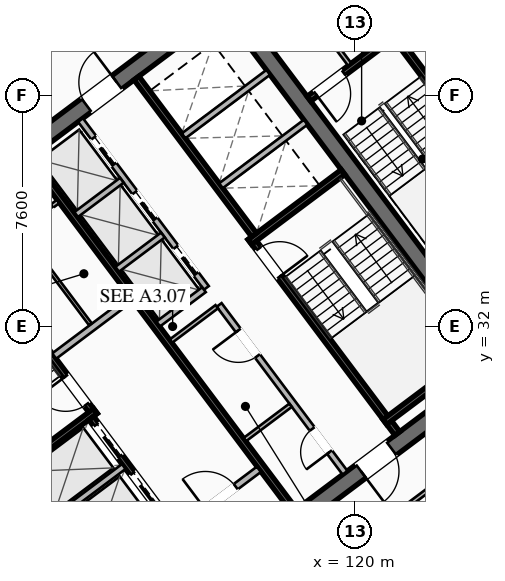
"""IFC4 building model, lengths in metres.
Left out: names, types, materials, properties, quantities, classifications, styles, units other than length and angle.
Written with IfcOpenShell. Run it as: python <this file> out.ifc"""

import sys

from ifc_helpers import new_model, si_unit, direction, frame, frame_2d, origin, place, context, subcontext, project, spatial, rectangle, extrude, element, fill, save


model = new_model("IFC4")
c1 = context("Model", 3, precision=1e-05, world=origin(), true_north=direction((0.0, 1.0)))
c2 = subcontext(c1, "Body", "Model", "MODEL_VIEW")
j1 = project(units=[si_unit("LENGTHUNIT", "METRE"), si_unit("PLANEANGLEUNIT", "RADIAN")], contexts=[c1])
p1 = place(None, origin())
s1 = spatial("IfcSite", under=j1, at=p1, CompositionType="ELEMENT")
p2 = place(p1, origin())
s2 = spatial("IfcBuilding", under=s1, at=p2, CompositionType="ELEMENT")
p3 = place(p2, frame((0.0, 0.0, 181.85)))
s3 = spatial("IfcBuildingStorey", under=s2, at=p3, CompositionType="ELEMENT", Elevation=181.85)
for number, where, z_axis, x_axis in (
    (1, (112.436, 21.077, 0.0), (0.0, 0.0, 1.0), (-0.6, 0.8, 0.0)),
    (2, (115.564, 42.923, 0.0), (0.0, 0.0, 1.0), (0.6, -0.8, 0.0)),
):
    element("IfcWall", number, at=place(p3, frame(where, z_axis=z_axis, x_axis=x_axis)), inside=s3, PredefinedType="SHEAR", context=c2, shape_type="SweptSolid", body=[
        extrude(rectangle(XDim=15.6, YDim=0.55, at=frame_2d((7.8, 0.0))), origin(), (0.0, 0.0, 1.0), 3.55),
    ])
p4 = place(p3, frame((124.539, 30.498, 0.0), z_axis=(0.0, 0.0, 1.0), x_axis=(-0.799998054672, -0.600002593761, 0.0)))
e3 = element("IfcWall", 3, at=p4, inside=s3, PredefinedType="SHEAR", context=c2, shape_type="SweptSolid", body=[
    extrude(rectangle(XDim=15.06, YDim=0.55, at=frame_2d((7.53, 0.0))), origin(), (0.0, 0.0, 1.0), 3.55),
])
p5 = place(p4, frame((9.23, 0.0, 0.0)))
e4 = element("IfcOpeningElement", 4, at=p5, cuts=e3, PredefinedType="OPENING", context=c2, shape_type="SweptSolid", body=[
    extrude(rectangle(XDim=1.25, YDim=2.25, at=frame_2d((0.625, 1.125))), frame((0.0, 0.285, 0.0), z_axis=(0.0, -1.0, 0.0), x_axis=(1.0, 0.0, 0.0)), (0.0, 0.0, 1.0), 0.57),
])
p6 = place(p4, frame((4.18, 0.0, 0.0)))
e5 = element("IfcOpeningElement", 5, at=p6, cuts=e3, PredefinedType="OPENING", context=c2, shape_type="SweptSolid", body=[
    extrude(rectangle(XDim=1.25, YDim=2.25, at=frame_2d((0.625, 1.125))), frame((0.0, 0.285, 0.0), z_axis=(0.0, -1.0, 0.0), x_axis=(1.0, 0.0, 0.0)), (0.0, 0.0, 1.0), 0.57),
])
p7 = place(p3, frame((103.461, 33.502, 0.0), z_axis=(0.0, 0.0, 1.0), x_axis=(0.799998054672, 0.600002593761, 0.0)))
e6 = element("IfcWall", 6, at=p7, inside=s3, PredefinedType="SHEAR", context=c2, shape_type="SweptSolid", body=[
    extrude(rectangle(XDim=15.06, YDim=0.55, at=frame_2d((7.53, 0.0))), origin(), (0.0, 0.0, 1.0), 3.55),
])
p8 = place(p7, frame((4.58, 0.0, 0.0)))
e7 = element("IfcOpeningElement", 7, at=p8, cuts=e6, PredefinedType="OPENING", context=c2, shape_type="SweptSolid", body=[
    extrude(rectangle(XDim=1.25, YDim=2.25, at=frame_2d((0.625, 1.125))), frame((0.0, 0.285, 0.0), z_axis=(0.0, -1.0, 0.0), x_axis=(1.0, 0.0, 0.0)), (0.0, 0.0, 1.0), 0.57),
])
p9 = place(p7, frame((9.63, 0.0, 0.0)))
e8 = element("IfcOpeningElement", 8, at=p9, cuts=e6, PredefinedType="OPENING", context=c2, shape_type="SweptSolid", body=[
    extrude(rectangle(XDim=1.25, YDim=2.25, at=frame_2d((0.625, 1.125))), frame((0.0, 0.285, 0.0), z_axis=(0.0, -1.0, 0.0), x_axis=(1.0, 0.0, 0.0)), (0.0, 0.0, 1.0), 0.57),
])
p10 = place(p3, frame((111.44, 29.08, 0.0), z_axis=(0.0, 0.0, 1.0), x_axis=(-0.59999029481, 0.8000072788, 0.0)))
e9 = element("IfcWall", 9, at=p10, inside=s3, PredefinedType="SHEAR", context=c2, shape_type="SweptSolid", body=[
    extrude(rectangle(XDim=8.05, YDim=0.2, at=frame_2d((4.025, 0.0))), origin(), (0.0, 0.0, 1.0), 3.37),
])
p11 = place(p10, frame((0.45, 0.0, 0.0)))
e10 = element("IfcOpeningElement", 10, at=p11, cuts=e9, PredefinedType="OPENING", context=c2, shape_type="SweptSolid", body=[
    extrude(rectangle(XDim=1.15, YDim=2.2, at=frame_2d((0.575, 1.1))), frame((0.0, 0.11, 0.0), z_axis=(0.0, -1.0, 0.0), x_axis=(1.0, 0.0, 0.0)), (0.0, 0.0, 1.0), 0.22),
])
p12 = place(p3, frame((108.396, 26.922, 0.0), z_axis=(0.0, 0.0, 1.0), x_axis=(0.800015298837, 0.599979601008, 0.0)))
e11 = element("IfcWall", 11, at=p12, inside=s3, PredefinedType="SHEAR", context=c2, shape_type="SweptSolid", body=[
    extrude(rectangle(XDim=3.83, YDim=0.2, at=frame_2d((1.915, 0.0))), origin(), (0.0, 0.0, 1.0), 3.37),
])
p13 = place(p3, frame((116.56, 34.92, 0.0), z_axis=(0.0, 0.0, 1.0), x_axis=(0.59999029481, -0.8000072788, 0.0)))
e12 = element("IfcWall", 12, at=p13, inside=s3, PredefinedType="SHEAR", context=c2, shape_type="SweptSolid", body=[
    extrude(rectangle(XDim=8.05, YDim=0.2, at=frame_2d((4.025, 0.0))), origin(), (0.0, 0.0, 1.0), 3.37),
])
p14 = place(p13, frame((0.45, 0.0, 0.0)))
e13 = element("IfcOpeningElement", 13, at=p14, cuts=e12, PredefinedType="OPENING", context=c2, shape_type="SweptSolid", body=[
    extrude(rectangle(XDim=1.15, YDim=2.2, at=frame_2d((0.575, 1.1))), frame((0.0, 0.11, 0.0), z_axis=(0.0, -1.0, 0.0), x_axis=(1.0, 0.0, 0.0)), (0.0, 0.0, 1.0), 0.22),
])
for number, where, z_axis, x_axis in (
    (14, (116.54, 34.78, 0.0), (0.0, 0.0, 1.0), (0.8, 0.6, 0.0)),
    (15, (120.98, 28.86, 0.0), (0.0, 0.0, 1.0), (0.8, 0.6, 0.0)),
):
    element("IfcWall", number, at=place(p3, frame(where, z_axis=z_axis, x_axis=x_axis)), inside=s3, PredefinedType="SHEAR", context=c2, shape_type="SweptSolid", body=[
        extrude(rectangle(XDim=3.83, YDim=0.2, at=frame_2d((1.915, 0.0))), origin(), (0.0, 0.0, 1.0), 3.37),
    ])
p15 = place(p3, frame((117.998, 25.936, 0.0), z_axis=(0.0, 0.0, 1.0), x_axis=(-0.600002693989, 0.799997979501, 0.0)))
e16 = element("IfcWall", 16, at=p15, inside=s3, PredefinedType="SHEAR", context=c2, shape_type="SweptSolid", body=[
    extrude(rectangle(XDim=14.5, YDim=0.2, at=frame_2d((7.25, 0.0))), origin(), (0.0, 0.0, 1.0), 3.37),
])
p16 = place(p3, frame((110.104, 31.028, 0.0), z_axis=(0.0, 0.0, 1.0), x_axis=(0.800018601094, 0.59997519774, 0.0)))
e17 = element("IfcWall", 17, at=p16, inside=s3, PredefinedType="SOLIDWALL", context=c2, shape_type="SweptSolid", body=[
    extrude(rectangle(XDim=3.15, YDim=0.22, at=frame_2d((1.575, 0.0))), origin(), (0.0, 0.0, 1.0), 2.723),
])
p17 = place(p3, frame((114.316, 25.412, 0.0), z_axis=(0.0, 0.0, 1.0), x_axis=(0.800018601094, 0.59997519774, 0.0)))
e18 = element("IfcWall", 18, at=p17, inside=s3, PredefinedType="SOLIDWALL", context=c2, shape_type="SweptSolid", body=[
    extrude(rectangle(XDim=3.15, YDim=0.22, at=frame_2d((1.575, 0.0))), origin(), (0.0, 0.0, 1.0), 2.723),
])
p18 = place(p17, frame((0.95, 0.0, 0.0)))
e19 = element("IfcOpeningElement", 19, at=p18, cuts=e18, PredefinedType="OPENING", context=c2, shape_type="SweptSolid", body=[
    extrude(rectangle(XDim=1.25, YDim=2.25, at=frame_2d((0.625, 1.125))), frame((0.0, 0.12, 0.0), z_axis=(0.0, -1.0, 0.0), x_axis=(1.0, 0.0, 0.0)), (0.0, 0.0, 1.0), 0.24),
])
p19 = place(p3, frame((115.19, 23.83, 0.0), z_axis=(0.0, 0.0, 1.0), x_axis=(-0.599993943644, 0.800004542231, 0.0)))
e20 = element("IfcWall", 20, at=p19, inside=s3, PredefinedType="SHEAR", context=c2, shape_type="SweptSolid", body=[
    extrude(rectangle(XDim=6.45, YDim=0.2, at=frame_2d((3.225, 0.0))), origin(), (0.0, 0.0, 1.0), 3.37),
])
p20 = place(p19, frame((4.875, 0.0, 0.0)))
e21 = element("IfcOpeningElement", 21, at=p20, cuts=e20, PredefinedType="OPENING", context=c2, shape_type="SweptSolid", body=[
    extrude(rectangle(XDim=1.3, YDim=2.25, at=frame_2d((0.65, 1.125))), frame((0.0, 0.11, 0.0), z_axis=(0.0, -1.0, 0.0), x_axis=(1.0, 0.0, 0.0)), (0.0, 0.0, 1.0), 0.22),
])
p21 = place(p19, frame((2.875, 0.0, 0.0)))
e22 = element("IfcOpeningElement", 22, at=p21, cuts=e20, PredefinedType="OPENING", context=c2, shape_type="SweptSolid", body=[
    extrude(rectangle(XDim=1.3, YDim=2.25, at=frame_2d((0.65, 1.125))), frame((0.0, 0.11, 0.0), z_axis=(0.0, -1.0, 0.0), x_axis=(1.0, 0.0, 0.0)), (0.0, 0.0, 1.0), 0.22),
])
p22 = place(p19, frame((0.675, 0.0, 0.0)))
e23 = element("IfcOpeningElement", 23, at=p22, cuts=e20, PredefinedType="OPENING", context=c2, shape_type="SweptSolid", body=[
    extrude(rectangle(XDim=1.3, YDim=2.25, at=frame_2d((0.65, 1.125))), frame((0.0, 0.11, 0.0), z_axis=(0.0, -1.0, 0.0), x_axis=(1.0, 0.0, 0.0)), (0.0, 0.0, 1.0), 0.22),
])
p23 = place(p3, frame((109.608, 25.306, 0.0), z_axis=(0.0, 0.0, 1.0), x_axis=(0.8, 0.6, 0.0)))
e24 = element("IfcWall", 24, at=p23, inside=s3, PredefinedType="SOLIDWALL", context=c2, shape_type="SweptSolid", body=[
    extrude(rectangle(XDim=3.48, YDim=0.2, at=frame_2d((1.74, 0.0))), origin(), (0.0, 0.0, 1.0), 3.37),
])
p24 = place(p3, frame((112.81, 40.17, 0.0), z_axis=(0.0, 0.0, 1.0), x_axis=(0.599993943644, -0.800004542231, 0.0)))
e25 = element("IfcWall", 25, at=p24, inside=s3, PredefinedType="SHEAR", context=c2, shape_type="SweptSolid", body=[
    extrude(rectangle(XDim=6.45, YDim=0.2, at=frame_2d((3.225, 0.0))), origin(), (0.0, 0.0, 1.0), 3.37),
])
for number, where, z_axis, x_axis in (
    (26, (115.59, 36.63, 0.0), (0.0, 0.0, 1.0), (0.8, 0.6, 0.0)),
    (27, (114.36, 38.27, 0.0), (0.0, 0.0, 1.0), (0.8, 0.6, 0.0)),
):
    element("IfcWall", number, at=place(p3, frame(where, z_axis=z_axis, x_axis=x_axis)), inside=s3, PredefinedType="SOLIDWALL", context=c2, shape_type="SweptSolid", body=[
        extrude(rectangle(XDim=3.48, YDim=0.2, at=frame_2d((1.74, 0.0))), origin(), (0.0, 0.0, 1.0), 3.37),
    ])
p25 = place(p3, frame((107.71, 34.22, 0.0), z_axis=(0.0, 0.0, 1.0), x_axis=(0.799981399002, 0.60002480053, 0.0)))
e28 = element("IfcWall", 28, at=p25, inside=s3, PredefinedType="PARTITIONING", context=c2, shape_type="SweptSolid", body=[
    extrude(rectangle(XDim=3.15, YDim=0.135, at=frame_2d((1.575, 0.0))), origin(), (0.0, 0.0, 1.0), 2.723),
])
p26 = place(p25, frame((0.25, 0.0, 0.0)))
e29 = element("IfcOpeningElement", 29, at=p26, cuts=e28, PredefinedType="OPENING", context=c2, shape_type="SweptSolid", body=[
    extrude(rectangle(XDim=0.95, YDim=2.05, at=frame_2d((0.475, 1.025))), frame((0.0, 0.077, 0.0), z_axis=(0.0, -1.0, 0.0), x_axis=(1.0, 0.0, 0.0)), (0.0, 0.0, 1.0), 0.155),
])
p27 = place(p25, frame((1.95, 0.0, 0.0)))
e30 = element("IfcOpeningElement", 30, at=p27, cuts=e28, PredefinedType="OPENING", context=c2, shape_type="SweptSolid", body=[
    extrude(rectangle(XDim=0.95, YDim=2.05, at=frame_2d((0.475, 1.025))), frame((0.0, 0.077, 0.0), z_axis=(0.0, -1.0, 0.0), x_axis=(1.0, 0.0, 0.0)), (0.0, 0.0, 1.0), 0.155),
])
p28 = place(p3, frame((111.296, 32.072, 0.0), z_axis=(0.0, 0.0, 1.0), x_axis=(-0.59995887973, 0.800030838552, 0.0)))
e31 = element("IfcWall", 31, at=p28, inside=s3, PredefinedType="PARTITIONING", context=c2, shape_type="SweptSolid", body=[
    extrude(rectangle(XDim=3.8, YDim=0.11, at=frame_2d((1.9, 0.0))), origin(), (0.0, 0.0, 1.0), 2.723),
])
p29 = place(p3, frame((119.67, 27.19, 0.0), z_axis=(0.0, 0.0, 1.0), x_axis=(-0.599988677396, 0.800008491828, 0.0)))
e32 = element("IfcWall", 32, at=p29, inside=s3, PredefinedType="SOLIDWALL", context=c2, shape_type="SweptSolid", body=[
    extrude(rectangle(XDim=6.9, YDim=0.2, at=frame_2d((3.45, 0.0))), origin(), (0.0, 0.0, 1.0), 2.723),
])
p30 = place(p29, frame((0.85, 0.0, 0.0)))
e33 = element("IfcOpeningElement", 33, at=p30, cuts=e32, PredefinedType="OPENING", context=c2, shape_type="SweptSolid", body=[
    extrude(rectangle(XDim=0.95, YDim=2.05, at=frame_2d((0.475, 1.025))), frame((0.0, 0.11, 0.0), z_axis=(0.0, -1.0, 0.0), x_axis=(1.0, 0.0, 0.0)), (0.0, 0.0, 1.0), 0.22),
])
p31 = place(p29, frame((4.8, 0.0, 0.0)))
e34 = element("IfcOpeningElement", 34, at=p31, cuts=e32, PredefinedType="OPENING", context=c2, shape_type="SweptSolid", body=[
    extrude(rectangle(XDim=1.05, YDim=2.2, at=frame_2d((0.525, 1.1))), frame((0.0, 0.11, 0.0), z_axis=(0.0, -1.0, 0.0), x_axis=(1.0, 0.0, 0.0)), (0.0, 0.0, 1.0), 0.22),
])
for number, where, z_axis, x_axis in (
    (35, (113.946, 31.522, 0.0), (0.0, 0.0, 1.0), (0.8, 0.6, 0.0)),
    (36, (116.376, 28.282, 0.0), (0.0, 0.0, 1.0), (0.8, 0.6, 0.0)),
):
    element("IfcWall", number, at=place(p3, frame(where, z_axis=z_axis, x_axis=x_axis)), inside=s3, PredefinedType="PARTITIONING", context=c2, shape_type="SweptSolid", body=[
        extrude(rectangle(XDim=1.88, YDim=0.135, at=frame_2d((0.94, 0.0))), origin(), (0.0, 0.0, 1.0), 2.723),
    ])
p32 = place(p3, frame((115.11, 33.27, 0.0), z_axis=(0.0, 0.0, 1.0), x_axis=(-0.600011322243, 0.799991508192, 0.0)))
e37 = element("IfcWall", 37, at=p32, inside=s3, PredefinedType="SOLIDWALL", context=c2, shape_type="SweptSolid", body=[
    extrude(rectangle(XDim=6.9, YDim=0.2, at=frame_2d((3.45, 0.0))), origin(), (0.0, 0.0, 1.0), 3.37),
])
p33 = place(p32, frame((0.575, 0.0, 0.0)))
e38 = element("IfcOpeningElement", 38, at=p33, cuts=e37, PredefinedType="OPENING", context=c2, shape_type="SweptSolid", body=[
    extrude(rectangle(XDim=1.1, YDim=2.2, at=frame_2d((0.55, 1.1))), frame((0.0, 0.11, 0.0), z_axis=(0.0, -1.0, 0.0), x_axis=(1.0, 0.0, 0.0)), (0.0, 0.0, 1.0), 0.22),
])
p34 = place(p32, frame((2.825, 0.0, 0.0)))
e39 = element("IfcOpeningElement", 39, at=p34, cuts=e37, PredefinedType="OPENING", context=c2, shape_type="SweptSolid", body=[
    extrude(rectangle(XDim=1.1, YDim=2.2, at=frame_2d((0.55, 1.1))), frame((0.0, 0.11, 0.0), z_axis=(0.0, -1.0, 0.0), x_axis=(1.0, 0.0, 0.0)), (0.0, 0.0, 1.0), 0.22),
])
p35 = place(p32, frame((5.075, 0.0, 0.0)))
e40 = element("IfcOpeningElement", 40, at=p35, cuts=e37, PredefinedType="OPENING", context=c2, shape_type="SweptSolid", body=[
    extrude(rectangle(XDim=1.1, YDim=2.2, at=frame_2d((0.55, 1.1))), frame((0.0, 0.11, 0.0), z_axis=(0.0, -1.0, 0.0), x_axis=(1.0, 0.0, 0.0)), (0.0, 0.0, 1.0), 0.22),
])
p36 = place(p3, frame((113.526, 32.082, 0.0), z_axis=(0.0, 0.0, 1.0), x_axis=(0.800046745961, 0.599937666993, 0.0)))
e41 = element("IfcWall", 41, at=p36, inside=s3, PredefinedType="SOLIDWALL", context=c2, shape_type="SweptSolid", body=[
    extrude(rectangle(XDim=1.88, YDim=0.2, at=frame_2d((0.94, 0.0))), origin(), (0.0, 0.0, 1.0), 3.37),
])
p37 = place(p3, frame((112.176, 33.882, 0.0), z_axis=(0.0, 0.0, 1.0), x_axis=(0.8, 0.6, 0.0)))
e42 = element("IfcWall", 42, at=p37, inside=s3, PredefinedType="SOLIDWALL", context=c2, shape_type="SweptSolid", body=[
    extrude(rectangle(XDim=1.88, YDim=0.2, at=frame_2d((0.94, 0.0))), origin(), (0.0, 0.0, 1.0), 3.37),
])
p38 = place(p3, frame((110.826, 35.682, 0.0), z_axis=(0.0, 0.0, 1.0), x_axis=(0.799984418148, 0.600020775241, 0.0)))
e43 = element("IfcWall", 43, at=p38, inside=s3, PredefinedType="SOLIDWALL", context=c2, shape_type="SweptSolid", body=[
    extrude(rectangle(XDim=1.88, YDim=0.2, at=frame_2d((0.94, 0.0))), origin(), (0.0, 0.0, 1.0), 3.37),
])
p39 = place(p3, frame((125.304, 36.228, 0.0), z_axis=(0.0, 0.0, 1.0), x_axis=(-0.59998851072, 0.800008616831, 0.0)))
e44 = element("IfcWall", 44, at=p39, inside=s3, PredefinedType="SHEAR", context=c2, shape_type="SweptSolid", body=[
    extrude(rectangle(XDim=6.8, YDim=0.2, at=frame_2d((3.4, 0.0))), origin(), (0.0, 0.0, 1.0), 3.37),
])
p40 = place(p3, frame((121.204, 41.528, 0.0), z_axis=(0.0, 0.0, 1.0), x_axis=(-0.800017232136, -0.599977023131, 0.0)))
e45 = element("IfcWall", 45, at=p40, inside=s3, PredefinedType="SHEAR", context=c2, shape_type="SweptSolid", body=[
    extrude(rectangle(XDim=3.4, YDim=0.2, at=frame_2d((1.7, 0.0))), origin(), (0.0, 0.0, 1.0), 3.37),
])
p41 = place(p40, frame((1.975, 0.0, 0.0)))
e46 = element("IfcOpeningElement", 46, at=p41, cuts=e45, PredefinedType="OPENING", context=c2, shape_type="SweptSolid", body=[
    extrude(rectangle(XDim=1.15, YDim=2.2, at=frame_2d((0.575, 1.1))), frame((0.0, 0.11, 0.0), z_axis=(0.0, -1.0, 0.0), x_axis=(1.0, 0.0, 0.0)), (0.0, 0.0, 1.0), 0.22),
])
p42 = place(p3, frame((119.824, 40.618, 0.0), z_axis=(0.0, 0.0, 1.0), x_axis=(-0.599982243973, 0.800013316712, 0.0)))
e47 = element("IfcWall", 47, at=p42, inside=s3, PredefinedType="PARTITIONING", context=c2, shape_type="SweptSolid", body=[
    extrude(rectangle(XDim=4.4, YDim=0.135, at=frame_2d((2.2, 0.0))), origin(), (0.0, 0.0, 1.0), 2.723),
])
p43 = place(p3, frame((96.268, 31.726, 0.0), z_axis=(0.0, 0.0, 1.0), x_axis=(0.8, 0.6, 0.0)))
e48 = element("IfcWall", 48, at=p43, inside=s3, PredefinedType="PARTITIONING", context=c2, shape_type="SweptSolid", body=[
    extrude(rectangle(XDim=28.7, YDim=0.135, at=frame_2d((14.35, 0.0))), origin(), (0.0, 0.0, 1.0), 2.723),
])
p44 = place(p43, frame((0.3, 0.0, 0.0)))
e49 = element("IfcOpeningElement", 49, at=p44, cuts=e48, PredefinedType="OPENING", context=c2, shape_type="SweptSolid", body=[
    extrude(rectangle(XDim=0.95, YDim=2.05, at=frame_2d((0.475, 1.025))), frame((0.0, 0.077, 0.0), z_axis=(0.0, -1.0, 0.0), x_axis=(1.0, 0.0, 0.0)), (0.0, 0.0, 1.0), 0.155),
])
p45 = place(p43, frame((27.45, 0.0, 0.0)))
e50 = element("IfcOpeningElement", 50, at=p45, cuts=e48, PredefinedType="OPENING", context=c2, shape_type="SweptSolid", body=[
    extrude(rectangle(XDim=0.95, YDim=2.05, at=frame_2d((0.475, 1.025))), frame((0.0, 0.077, 0.0), z_axis=(0.0, -1.0, 0.0), x_axis=(1.0, 0.0, 0.0)), (0.0, 0.0, 1.0), 0.155),
])
p46 = place(p3, frame((131.09, 33.13, 0.0), z_axis=(0.0, 0.0, 1.0), x_axis=(-0.800003062365, -0.599995916825, 0.0)))
e51 = element("IfcWall", 51, at=p46, inside=s3, PredefinedType="PARTITIONING", context=c2, shape_type="SweptSolid", body=[
    extrude(rectangle(XDim=28.7, YDim=0.135, at=frame_2d((14.35, 0.0))), origin(), (0.0, 0.0, 1.0), 2.723),
])
p47 = place(p46, frame((27.37, 0.0, 0.0)))
e52 = element("IfcOpeningElement", 52, at=p47, cuts=e51, PredefinedType="OPENING", context=c2, shape_type="SweptSolid", body=[
    extrude(rectangle(XDim=0.95, YDim=2.05, at=frame_2d((0.475, 1.025))), frame((0.0, 0.077, 0.0), z_axis=(0.0, -1.0, 0.0), x_axis=(1.0, 0.0, 0.0)), (0.0, 0.0, 1.0), 0.155),
])
p48 = place(p46, frame((0.38, 0.0, 0.0)))
e53 = element("IfcOpeningElement", 53, at=p48, cuts=e51, PredefinedType="OPENING", context=c2, shape_type="SweptSolid", body=[
    extrude(rectangle(XDim=0.95, YDim=2.05, at=frame_2d((0.475, 1.025))), frame((0.0, 0.077, 0.0), z_axis=(0.0, -1.0, 0.0), x_axis=(1.0, 0.0, 0.0)), (0.0, 0.0, 1.0), 0.155),
])
p49 = place(p3, frame((112.104, 20.928, 0.0), z_axis=(0.0, 0.0, 1.0), x_axis=(-0.599994940075, 0.800003794918, 0.0)))
e54 = element("IfcWall", 54, at=p49, inside=s3, PredefinedType="PARTITIONING", context=c2, shape_type="SweptSolid", body=[
    extrude(rectangle(XDim=15.44, YDim=0.135, at=frame_2d((7.72, 0.0))), origin(), (0.0, 0.0, 1.0), 2.723),
])
p50 = place(p9, origin())
e55 = element("IfcDoor", 55, at=p50, inside=s3, OperationType="SINGLE_SWING_RIGHT", PredefinedType="DOOR", context=c2, shape_type="SweptSolid", body=[
    extrude(rectangle(XDim=1.25, YDim=2.25, at=frame_2d((0.625, 1.125))), frame((0.0, 0.025, 0.0), z_axis=(0.0, -1.0, 0.0), x_axis=(1.0, 0.0, 0.0)), (0.0, 0.0, 1.0), 0.05),
])
fill(e8, e55)
p51 = place(p6, origin())
e56 = element("IfcDoor", 56, at=p51, inside=s3, OperationType="SINGLE_SWING_RIGHT", PredefinedType="DOOR", context=c2, shape_type="SweptSolid", body=[
    extrude(rectangle(XDim=1.25, YDim=2.25, at=frame_2d((0.625, 1.125))), frame((0.0, 0.025, 0.0), z_axis=(0.0, -1.0, 0.0), x_axis=(1.0, 0.0, 0.0)), (0.0, 0.0, 1.0), 0.05),
])
fill(e5, e56)
p52 = place(p11, origin())
e57 = element("IfcDoor", 57, at=p52, inside=s3, OperationType="SINGLE_SWING_RIGHT", PredefinedType="DOOR", context=c2, shape_type="SweptSolid", body=[
    extrude(rectangle(XDim=1.15, YDim=2.2, at=frame_2d((0.575, 1.1))), frame((0.0, 0.025, 0.0), z_axis=(0.0, -1.0, 0.0), x_axis=(1.0, 0.0, 0.0)), (0.0, 0.0, 1.0), 0.05),
])
fill(e10, e57)
p53 = place(p14, origin())
e58 = element("IfcDoor", 58, at=p53, inside=s3, OperationType="SINGLE_SWING_RIGHT", PredefinedType="DOOR", context=c2, shape_type="SweptSolid", body=[
    extrude(rectangle(XDim=1.15, YDim=2.2, at=frame_2d((0.575, 1.1))), frame((0.0, 0.025, 0.0), z_axis=(0.0, -1.0, 0.0), x_axis=(1.0, 0.0, 0.0)), (0.0, 0.0, 1.0), 0.05),
])
fill(e13, e58)
p54 = place(p18, origin())
e59 = element("IfcDoor", 59, at=p54, inside=s3, OperationType="SINGLE_SWING_LEFT", PredefinedType="DOOR", context=c2, shape_type="SweptSolid", body=[
    extrude(rectangle(XDim=1.25, YDim=2.25, at=frame_2d((0.625, 1.125))), frame((0.0, 0.025, 0.0), z_axis=(0.0, -1.0, 0.0), x_axis=(1.0, 0.0, 0.0)), (0.0, 0.0, 1.0), 0.05),
])
fill(e19, e59)
p55 = place(p30, origin())
e60 = element("IfcDoor", 60, at=p55, inside=s3, OperationType="SINGLE_SWING_LEFT", PredefinedType="DOOR", context=c2, shape_type="SweptSolid", body=[
    extrude(rectangle(XDim=0.95, YDim=2.05, at=frame_2d((0.475, 1.025))), frame((0.0, 0.025, 0.0), z_axis=(0.0, -1.0, 0.0), x_axis=(1.0, 0.0, 0.0)), (0.0, 0.0, 1.0), 0.05),
])
fill(e33, e60)
p56 = place(p31, origin())
e61 = element("IfcDoor", 61, at=p56, inside=s3, OperationType="SINGLE_SWING_RIGHT", PredefinedType="DOOR", context=c2, shape_type="SweptSolid", body=[
    extrude(rectangle(XDim=1.05, YDim=2.2, at=frame_2d((0.525, 1.1))), frame((0.0, 0.025, 0.0), z_axis=(0.0, -1.0, 0.0), x_axis=(1.0, 0.0, 0.0)), (0.0, 0.0, 1.0), 0.05),
])
fill(e34, e61)
p57 = place(p41, origin())
e62 = element("IfcDoor", 62, at=p57, inside=s3, OperationType="SINGLE_SWING_RIGHT", PredefinedType="DOOR", context=c2, shape_type="SweptSolid", body=[
    extrude(rectangle(XDim=1.15, YDim=2.2, at=frame_2d((0.575, 1.1))), frame((0.0, 0.025, 0.0), z_axis=(0.0, -1.0, 0.0), x_axis=(1.0, 0.0, 0.0)), (0.0, 0.0, 1.0), 0.05),
])
fill(e46, e62)
p58 = place(p20, origin())
e63 = element("IfcDoor", 63, at=p58, inside=s3, OperationType="SLIDING_TO_LEFT", PredefinedType="DOOR", context=c2, shape_type="SweptSolid", body=[
    extrude(rectangle(XDim=1.3, YDim=2.25, at=frame_2d((0.65, 1.125))), frame((0.0, 0.025, 0.0), z_axis=(0.0, -1.0, 0.0), x_axis=(1.0, 0.0, 0.0)), (0.0, 0.0, 1.0), 0.05),
])
fill(e21, e63)
p59 = place(p21, origin())
e64 = element("IfcDoor", 64, at=p59, inside=s3, OperationType="SLIDING_TO_LEFT", PredefinedType="DOOR", context=c2, shape_type="SweptSolid", body=[
    extrude(rectangle(XDim=1.3, YDim=2.25, at=frame_2d((0.65, 1.125))), frame((0.0, 0.025, 0.0), z_axis=(0.0, -1.0, 0.0), x_axis=(1.0, 0.0, 0.0)), (0.0, 0.0, 1.0), 0.05),
])
fill(e22, e64)
p60 = place(p33, origin())
e65 = element("IfcDoor", 65, at=p60, inside=s3, OperationType="SLIDING_TO_LEFT", PredefinedType="DOOR", context=c2, shape_type="SweptSolid", body=[
    extrude(rectangle(XDim=1.1, YDim=2.2, at=frame_2d((0.55, 1.1))), frame((0.0, 0.025, 0.0), z_axis=(0.0, -1.0, 0.0), x_axis=(1.0, 0.0, 0.0)), (0.0, 0.0, 1.0), 0.05),
])
fill(e38, e65)
p61 = place(p34, origin())
e66 = element("IfcDoor", 66, at=p61, inside=s3, OperationType="SLIDING_TO_LEFT", PredefinedType="DOOR", context=c2, shape_type="SweptSolid", body=[
    extrude(rectangle(XDim=1.1, YDim=2.2, at=frame_2d((0.55, 1.1))), frame((0.0, 0.025, 0.0), z_axis=(0.0, -1.0, 0.0), x_axis=(1.0, 0.0, 0.0)), (0.0, 0.0, 1.0), 0.05),
])
fill(e39, e66)
p62 = place(p35, origin())
e67 = element("IfcDoor", 67, at=p62, inside=s3, OperationType="SLIDING_TO_LEFT", PredefinedType="DOOR", context=c2, shape_type="SweptSolid", body=[
    extrude(rectangle(XDim=1.1, YDim=2.2, at=frame_2d((0.55, 1.1))), frame((0.0, 0.025, 0.0), z_axis=(0.0, -1.0, 0.0), x_axis=(1.0, 0.0, 0.0)), (0.0, 0.0, 1.0), 0.05),
])
fill(e40, e67)
save(model, sys.argv[1])
